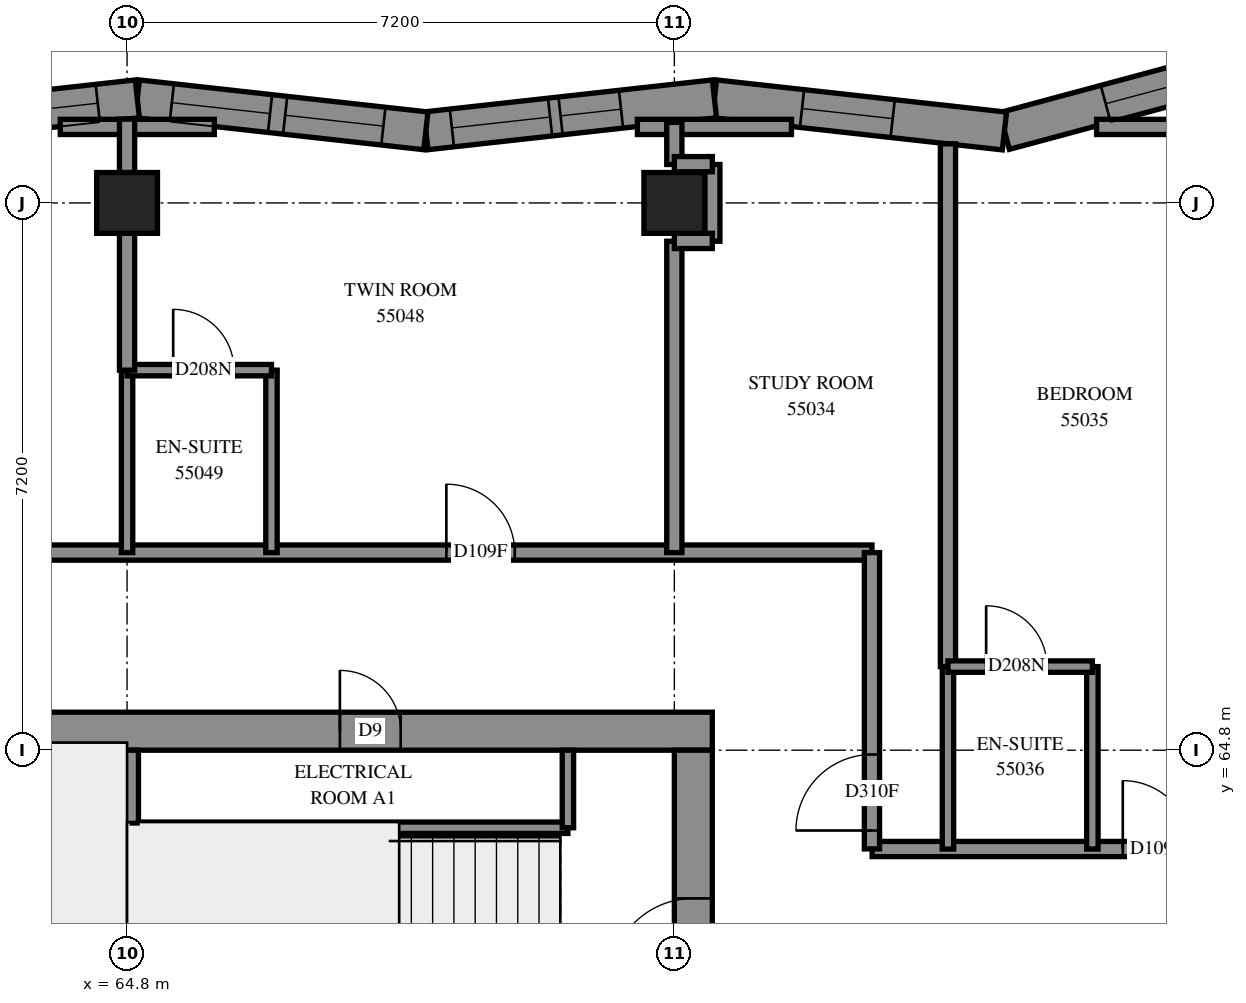
"""IFC4 building model, lengths in metres.
Left out: names, types, materials, properties, quantities, classifications, styles, units other than length and angle.
Written with IfcOpenShell. Run it as: python <this file> out.ifc"""

import sys

from ifc_helpers import new_model, si_unit, direction, frame, frame_2d, origin, origin_2d, place, context, subcontext, project, spatial, polyline, rectangle, outline, extrude, element, fill, save


model = new_model("IFC4")
c1 = context("Model", 3, precision=1e-05, world=origin(), true_north=direction((0.0, 1.0)))
c2 = subcontext(c1, "Body", "Model", "MODEL_VIEW")
j1 = project(units=[si_unit("LENGTHUNIT", "METRE"), si_unit("PLANEANGLEUNIT", "RADIAN")], contexts=[c1])
p1 = place(None, origin())
s1 = spatial("IfcSite", under=j1, at=p1, CompositionType="ELEMENT")
p2 = place(p1, origin())
s2 = spatial("IfcBuilding", under=s1, at=p2, CompositionType="ELEMENT")
p3 = place(p2, frame((0.0, 0.0, 203.2)))
s3 = spatial("IfcBuildingStorey", under=s2, at=p3, CompositionType="ELEMENT", Elevation=203.2)
for number, where, z_axis, x_axis in (
    (1, (64.8, 72.0, 0.0), (0.0, 0.0, 1.0), (1.0, 0.0, 0.0)),
    (2, (72.0, 72.0, 0.0), (0.0, 0.0, 1.0), (1.0, 0.0, 0.0)),
):
    element("IfcColumn", number, at=place(p3, frame(where, z_axis=z_axis, x_axis=x_axis)), inside=s3, PredefinedType="COLUMN", context=c2, shape_type="SweptSolid", body=[
        extrude(rectangle(XDim=0.8, YDim=0.8, at=origin_2d()), origin(), (0.0, 0.0, 1.0), 3.1),
    ])
p4 = place(p3, frame((57.1, 65.05, -0.3), z_axis=(0.0, 0.0, 1.0), x_axis=(1.0, 0.0, 0.0)))
e3 = element("IfcWall", 3, at=p4, inside=s3, PredefinedType="SHEAR", context=c2, shape_type="SweptSolid", body=[
    extrude(rectangle(XDim=15.4, YDim=0.5, at=frame_2d((7.7, 0.0))), origin(), (0.0, 0.0, 1.0), 2.7),
])
p5 = place(p4, frame((10.5, 0.0, 0.3)))
e4 = element("IfcOpeningElement", 4, at=p5, cuts=e3, PredefinedType="OPENING", context=c2, shape_type="SweptSolid", body=[
    extrude(rectangle(XDim=0.8, YDim=2.1, at=frame_2d((0.4, 1.05))), frame((0.0, 0.26, 0.0), z_axis=(0.0, -1.0, 0.0), x_axis=(1.0, 0.0, 0.0)), (0.0, 0.0, 1.0), 0.52),
])
p6 = place(p3, frame((72.25, 50.4, -0.3), z_axis=(0.0, 0.0, 1.0), x_axis=(0.0, 1.0, 0.0)))
e5 = element("IfcWall", 5, at=p6, inside=s3, PredefinedType="SHEAR", context=c2, shape_type="SweptSolid", body=[
    extrude(rectangle(XDim=14.4, YDim=0.5, at=frame_2d((7.2, 0.0))), origin(), (0.0, 0.0, 1.0), 2.7),
])
p7 = place(p6, frame((4.55, 0.0, 0.3)))
e6 = element("IfcOpeningElement", 6, at=p7, cuts=e5, PredefinedType="OPENING", context=c2, shape_type="SweptSolid", body=[
    extrude(rectangle(XDim=1.1, YDim=2.1, at=frame_2d((0.55, 1.05))), frame((0.0, 0.26, 0.0), z_axis=(0.0, -1.0, 0.0), x_axis=(1.0, 0.0, 0.0)), (0.0, 0.0, 1.0), 0.52),
])
p8 = place(p6, frame((11.35, 0.0, 0.3)))
e7 = element("IfcOpeningElement", 7, at=p8, cuts=e5, PredefinedType="OPENING", context=c2, shape_type="SweptSolid", body=[
    extrude(rectangle(XDim=1.1, YDim=2.1, at=frame_2d((0.55, 1.05))), frame((0.0, 0.26, 0.0), z_axis=(0.0, -1.0, 0.0), x_axis=(1.0, 0.0, 0.0)), (0.0, 0.0, 1.0), 0.52),
])
p9 = place(p3, frame((64.8, 60.6, 0.0), z_axis=(0.0, 0.0, 1.0), x_axis=(0.0, 1.0, 0.0)))
e8 = element("IfcWall", 8, at=p9, inside=s3, PredefinedType="SOLIDWALL", context=c2, shape_type="SweptSolid", body=[
    extrude(rectangle(XDim=4.2, YDim=0.3, at=frame_2d((2.1, 0.0))), origin(), (0.0, 0.0, 1.0), 3.1),
])
p10 = place(p3, frame((79.993, 73.928, 0.0), z_axis=(0.0, 0.0, 1.0), x_axis=(-0.9656859812, -0.259712506, 0.0)))
e9 = element("IfcWall", 9, at=p10, inside=s3, PredefinedType="SOLIDWALL", context=c2, shape_type="SweptSolid", body=[
    extrude(outline(polyline([(-0.199, -0.25), (3.732, -0.25), (3.826, 0.25), (0.199, 0.25), (-0.199, -0.25)])), origin(), (0.0, 0.0, 1.0), 3.1),
])
p11 = place(p10, frame((1.2, 0.0, 0.45)))
e10 = element("IfcOpeningElement", 10, at=p11, cuts=e9, PredefinedType="OPENING", context=c2, shape_type="SweptSolid", body=[
    extrude(rectangle(XDim=1.2, YDim=2.5, at=frame_2d((0.6, 1.25))), frame((0.0, 0.26, 0.0), z_axis=(0.0, -1.0, 0.0), x_axis=(1.0, 0.0, 0.0)), (0.0, 0.0, 1.0), 0.52),
])
p12 = place(p3, frame((76.343, 72.946, 0.0), z_axis=(0.0, 0.0, 1.0), x_axis=(-0.9939056334, 0.1102342595, 0.0)))
e11 = element("IfcWall", 11, at=p12, inside=s3, PredefinedType="SOLIDWALL", context=c2, shape_type="SweptSolid", body=[
    extrude(outline(polyline([(0.047, -0.25), (3.867, -0.25), (3.811, 0.25), (-0.047, 0.25), (0.047, -0.25)])), origin(), (0.0, 0.0, 1.0), 3.1),
])
p13 = place(p12, frame((1.48, 0.0, 0.45)))
e12 = element("IfcOpeningElement", 12, at=p13, cuts=e11, PredefinedType="OPENING", context=c2, shape_type="SweptSolid", body=[
    extrude(rectangle(XDim=1.2, YDim=2.5, at=frame_2d((0.6, 1.25))), frame((0.0, 0.26, 0.0), z_axis=(0.0, -1.0, 0.0), x_axis=(1.0, 0.0, 0.0)), (0.0, 0.0, 1.0), 0.52),
])
p14 = place(p3, frame((72.527, 73.37, 0.0), z_axis=(0.0, 0.0, 1.0), x_axis=(-0.99390702, -0.1102217568, 0.0)))
e13 = element("IfcWall", 13, at=p14, inside=s3, PredefinedType="SOLIDWALL", context=c2, shape_type="SweptSolid", body=[
    extrude(outline(polyline([(-0.028, -0.25), (3.792, -0.25), (3.847, 0.25), (0.028, 0.25), (-0.028, -0.25)])), origin(), (0.0, 0.0, 1.0), 3.1),
])
p15 = place(p14, frame((2.175, 0.0, 0.45)))
e14 = element("IfcOpeningElement", 14, at=p15, cuts=e13, PredefinedType="OPENING", context=c2, shape_type="SweptSolid", body=[
    extrude(rectangle(XDim=1.3, YDim=2.5, at=frame_2d((0.65, 1.25))), frame((0.0, 0.26, 0.0), z_axis=(0.0, -1.0, 0.0), x_axis=(1.0, 0.0, 0.0)), (0.0, 0.0, 1.0), 0.52),
])
p16 = place(p14, frame((1.236, 0.0, 0.45)))
e15 = element("IfcOpeningElement", 15, at=p16, cuts=e13, PredefinedType="OPENING", context=c2, shape_type="SweptSolid", body=[
    extrude(rectangle(XDim=0.8, YDim=2.5, at=frame_2d((0.4, 1.25))), frame((0.0, 0.26, 0.0), z_axis=(0.0, -1.0, 0.0), x_axis=(1.0, 0.0, 0.0)), (0.0, 0.0, 1.0), 0.52),
])
p17 = place(p3, frame((68.731, 72.948, 0.0), z_axis=(0.0, 0.0, 1.0), x_axis=(-0.99390702, 0.1102217568, 0.0)))
e16 = element("IfcWall", 16, at=p17, inside=s3, PredefinedType="SOLIDWALL", context=c2, shape_type="SweptSolid", body=[
    extrude(outline(polyline([(0.028, -0.25), (3.847, -0.25), (3.792, 0.25), (-0.028, 0.25), (0.028, -0.25)])), origin(), (0.0, 0.0, 1.0), 3.1),
])
p18 = place(p17, frame((0.562, 0.0, 0.45)))
e17 = element("IfcOpeningElement", 17, at=p18, cuts=e16, PredefinedType="OPENING", context=c2, shape_type="SweptSolid", body=[
    extrude(rectangle(XDim=1.3, YDim=2.5, at=frame_2d((0.65, 1.25))), frame((0.0, 0.26, 0.0), z_axis=(0.0, -1.0, 0.0), x_axis=(1.0, 0.0, 0.0)), (0.0, 0.0, 1.0), 0.52),
])
p19 = place(p17, frame((2.062, 0.0, 0.45)))
e18 = element("IfcOpeningElement", 18, at=p19, cuts=e16, PredefinedType="OPENING", context=c2, shape_type="SweptSolid", body=[
    extrude(rectangle(XDim=1.3, YDim=2.5, at=frame_2d((0.65, 1.25))), frame((0.0, 0.26, 0.0), z_axis=(0.0, -1.0, 0.0), x_axis=(1.0, 0.0, 0.0)), (0.0, 0.0, 1.0), 0.52),
])
p20 = place(p3, frame((64.935, 73.37, 0.0), z_axis=(0.0, 0.0, 1.0), x_axis=(-0.993907338, -0.1102188888, 0.0)))
e19 = element("IfcWall", 19, at=p20, inside=s3, PredefinedType="SOLIDWALL", context=c2, shape_type="SweptSolid", body=[
    extrude(outline(polyline([(-0.028, -0.25), (3.792, -0.25), (3.847, 0.25), (0.028, 0.25), (-0.028, -0.25)])), origin(), (0.0, 0.0, 1.0), 3.1),
])
p21 = place(p20, frame((0.524, 0.0, 0.45)))
e20 = element("IfcOpeningElement", 20, at=p21, cuts=e19, PredefinedType="OPENING", context=c2, shape_type="SweptSolid", body=[
    extrude(rectangle(XDim=1.3, YDim=2.5, at=frame_2d((0.65, 1.25))), frame((0.0, 0.26, 0.0), z_axis=(0.0, -1.0, 0.0), x_axis=(1.0, 0.0, 0.0)), (0.0, 0.0, 1.0), 0.52),
])
p22 = place(p20, frame((2.024, 0.0, 0.45)))
e21 = element("IfcOpeningElement", 21, at=p22, cuts=e19, PredefinedType="OPENING", context=c2, shape_type="SweptSolid", body=[
    extrude(rectangle(XDim=1.3, YDim=2.5, at=frame_2d((0.65, 1.25))), frame((0.0, 0.26, 0.0), z_axis=(0.0, -1.0, 0.0), x_axis=(1.0, 0.0, 0.0)), (0.0, 0.0, 1.0), 0.52),
])
p23 = place(p3, frame((64.95, 63.78, 0.0), z_axis=(0.0, 0.0, 1.0), x_axis=(1.0, 0.0, 0.0)))
e22 = element("IfcWall", 22, at=p23, inside=s3, PredefinedType="PARTITIONING", context=c2, shape_type="SweptSolid", body=[
    extrude(rectangle(XDim=5.65, YDim=0.15, at=frame_2d((2.825, 0.0))), origin(), (0.0, 0.0, 1.0), 3.1),
])
p24 = place(p3, frame((70.6, 63.78, 0.0), z_axis=(0.0, 0.0, 1.0), x_axis=(0.0, 1.0, 0.0)))
e23 = element("IfcWall", 23, at=p24, inside=s3, PredefinedType="PARTITIONING", context=c2, shape_type="SweptSolid", body=[
    extrude(rectangle(XDim=1.02, YDim=0.15, at=frame_2d((0.51, 0.0))), origin(), (0.0, 0.0, 1.0), 3.1),
])
p25 = place(p3, frame((55.0, 67.4, 0.0), z_axis=(0.0, 0.0, 1.0), x_axis=(1.0, 0.0, 0.0)))
e24 = element("IfcWall", 24, at=p25, inside=s3, PredefinedType="PARTITIONING", context=c2, shape_type="SweptSolid", body=[
    extrude(rectangle(XDim=19.6, YDim=0.2, at=frame_2d((9.8, 0.0))), origin(), (0.0, 0.0, 1.0), 3.1),
])
p26 = place(p25, frame((6.499, 0.0, 0.0)))
e25 = element("IfcOpeningElement", 25, at=p26, cuts=e24, PredefinedType="OPENING", context=c2, shape_type="SweptSolid", body=[
    extrude(rectangle(XDim=0.9, YDim=2.1, at=frame_2d((0.45, 1.05))), frame((0.0, 0.11, 0.0), z_axis=(0.0, -1.0, 0.0), x_axis=(1.0, 0.0, 0.0)), (0.0, 0.0, 1.0), 0.22),
])
p27 = place(p25, frame((14.001, 0.0, 0.0)))
e26 = element("IfcOpeningElement", 26, at=p27, cuts=e24, PredefinedType="OPENING", context=c2, shape_type="SweptSolid", body=[
    extrude(rectangle(XDim=0.9, YDim=2.1, at=frame_2d((0.45, 1.05))), frame((0.0, 0.11, 0.0), z_axis=(0.0, -1.0, 0.0), x_axis=(1.0, 0.0, 0.0)), (0.0, 0.0, 1.0), 0.22),
])
p28 = place(p3, frame((75.6, 65.9, 0.0), z_axis=(0.0, 0.0, 1.0), x_axis=(0.0, 1.0, 0.0)))
e27 = element("IfcWall", 27, at=p28, inside=s3, PredefinedType="PARTITIONING", context=c2, shape_type="SweptSolid", body=[
    extrude(rectangle(XDim=6.877, YDim=0.2, at=frame_2d((3.439, 0.0))), origin(), (0.0, 0.0, 1.0), 3.1),
])
p29 = place(p3, frame((74.602, 63.5, 0.0), z_axis=(0.0, 0.0, 1.0), x_axis=(1.0, 0.0, 0.0)))
e28 = element("IfcWall", 28, at=p29, inside=s3, PredefinedType="PARTITIONING", context=c2, shape_type="SweptSolid", body=[
    extrude(rectangle(XDim=4.598, YDim=0.2, at=frame_2d((2.299, 0.0))), origin(), (0.0, 0.0, 1.0), 3.1),
])
p30 = place(p29, frame((3.298, 0.0, 0.0)))
e29 = element("IfcOpeningElement", 29, at=p30, cuts=e28, PredefinedType="OPENING", context=c2, shape_type="SweptSolid", body=[
    extrude(rectangle(XDim=0.9, YDim=2.1, at=frame_2d((0.45, 1.05))), frame((0.0, 0.11, 0.0), z_axis=(0.0, -1.0, 0.0), x_axis=(1.0, 0.0, 0.0)), (0.0, 0.0, 1.0), 0.22),
])
p31 = place(p3, frame((72.0, 67.4, 0.0), z_axis=(0.0, 0.0, 1.0), x_axis=(0.0, 1.0, 0.0)))
e30 = element("IfcWall", 30, at=p31, inside=s3, PredefinedType="PARTITIONING", context=c2, shape_type="SweptSolid", body=[
    extrude(rectangle(XDim=4.096, YDim=0.2, at=frame_2d((2.048, 0.0))), origin(), (0.0, 0.0, 1.0), 3.1),
])
p32 = place(p3, frame((74.6, 63.502, 0.0), z_axis=(0.0, 0.0, 1.0), x_axis=(0.0, 1.0, 0.0)))
e31 = element("IfcWall", 31, at=p32, inside=s3, PredefinedType="PARTITIONING", context=c2, shape_type="SweptSolid", body=[
    extrude(rectangle(XDim=3.898, YDim=0.2, at=frame_2d((1.949, 0.0))), origin(), (0.0, 0.0, 1.0), 3.1),
])
p33 = place(p32, frame((0.242, 0.0, 0.0)))
e32 = element("IfcOpeningElement", 32, at=p33, cuts=e31, PredefinedType="OPENING", context=c2, shape_type="SweptSolid", body=[
    extrude(rectangle(XDim=1.0, YDim=2.1, at=frame_2d((0.5, 1.05))), frame((0.0, 0.11, 0.0), z_axis=(0.0, -1.0, 0.0), x_axis=(1.0, 0.0, 0.0)), (0.0, 0.0, 1.0), 0.22),
])
for number, where, z_axis, x_axis in (
    (33, (75.6, 63.5, 0.0), (0.0, 0.0, 1.0), (0.0, 1.0, 0.0)),
    (34, (77.5, 63.5, 0.0), (0.0, 0.0, 1.0), (0.0, 1.0, 0.0)),
    (35, (66.7, 67.4, 0.0), (0.0, 0.0, 1.0), (0.0, 1.0, 0.0)),
    (36, (64.8, 67.4, 0.0), (0.0, 0.0, 1.0), (0.0, 1.0, 0.0)),
):
    element("IfcWall", number, at=place(p3, frame(where, z_axis=z_axis, x_axis=x_axis)), inside=s3, PredefinedType="PARTITIONING", context=c2, shape_type="SweptSolid", body=[
        extrude(rectangle(XDim=2.4, YDim=0.15, at=frame_2d((1.2, 0.0))), origin(), (0.0, 0.0, 1.0), 3.1),
    ])
for number, where, z_axis, x_axis in (
    (37, (63.921, 73.0, 0.0), (0.0, 0.0, 1.0), (1.0, 0.0, 0.0)),
    (38, (71.514, 73.0, 0.0), (0.0, 0.0, 1.0), (1.0, 0.0, 0.0)),
):
    element("IfcWall", number, at=place(p3, frame(where, z_axis=z_axis, x_axis=x_axis)), inside=s3, PredefinedType="PARTITIONING", context=c2, shape_type="SweptSolid", body=[
        extrude(rectangle(XDim=2.027, YDim=0.2, at=frame_2d((1.013, 0.0))), origin(), (0.0, 0.0, 1.0), 3.1),
    ])
p34 = place(p3, frame((75.6, 65.9, 0.0), z_axis=(0.0, 0.0, 1.0), x_axis=(1.0, 0.0, 0.0)))
e39 = element("IfcWall", 39, at=p34, inside=s3, PredefinedType="PARTITIONING", context=c2, shape_type="SweptSolid", body=[
    extrude(rectangle(XDim=1.9, YDim=0.15, at=frame_2d((0.95, 0.0))), origin(), (0.0, 0.0, 1.0), 3.1),
])
p35 = place(p34, frame((0.502, 0.0, 0.0)))
e40 = element("IfcOpeningElement", 40, at=p35, cuts=e39, PredefinedType="OPENING", context=c2, shape_type="SweptSolid", body=[
    extrude(rectangle(XDim=0.8, YDim=2.1, at=frame_2d((0.4, 1.05))), frame((0.0, 0.085, 0.0), z_axis=(0.0, -1.0, 0.0), x_axis=(1.0, 0.0, 0.0)), (0.0, 0.0, 1.0), 0.17),
])
p36 = place(p3, frame((64.8, 69.8, 0.0), z_axis=(0.0, 0.0, 1.0), x_axis=(1.0, 0.0, 0.0)))
e41 = element("IfcWall", 41, at=p36, inside=s3, PredefinedType="PARTITIONING", context=c2, shape_type="SweptSolid", body=[
    extrude(rectangle(XDim=1.9, YDim=0.15, at=frame_2d((0.95, 0.0))), origin(), (0.0, 0.0, 1.0), 3.1),
])
p37 = place(p36, frame((0.607, 0.0, 0.0)))
e42 = element("IfcOpeningElement", 42, at=p37, cuts=e41, PredefinedType="OPENING", context=c2, shape_type="SweptSolid", body=[
    extrude(rectangle(XDim=0.8, YDim=2.1, at=frame_2d((0.4, 1.05))), frame((0.0, 0.085, 0.0), z_axis=(0.0, -1.0, 0.0), x_axis=(1.0, 0.0, 0.0)), (0.0, 0.0, 1.0), 0.17),
])
p38 = place(p3, frame((64.8, 69.8, 0.0), z_axis=(0.0, 0.0, 1.0), x_axis=(0.0, 1.0, 0.0)))
e43 = element("IfcWall", 43, at=p38, inside=s3, PredefinedType="PARTITIONING", context=c2, shape_type="SweptSolid", body=[
    extrude(rectangle(XDim=1.8, YDim=0.2, at=frame_2d((0.9, 0.0))), origin(), (0.0, 0.0, 1.0), 3.1),
])
p39 = place(p3, frame((77.555, 73.0, 0.0), z_axis=(0.0, 0.0, 1.0), x_axis=(1.0, 0.0, 0.0)))
e44 = element("IfcWall", 44, at=p39, inside=s3, PredefinedType="PARTITIONING", context=c2, shape_type="SweptSolid", body=[
    extrude(rectangle(XDim=1.645, YDim=0.2, at=frame_2d((0.822, 0.0))), origin(), (0.0, 0.0, 1.0), 3.1),
])
p40 = place(p3, frame((72.5, 71.496, 0.0), z_axis=(0.0, 0.0, 1.0), x_axis=(0.0, 1.0, 0.0)))
e45 = element("IfcWall", 45, at=p40, inside=s3, PredefinedType="PARTITIONING", context=c2, shape_type="SweptSolid", body=[
    extrude(rectangle(XDim=1.01, YDim=0.2, at=frame_2d((0.505, 0.0))), origin(), (0.0, 0.0, 1.0), 3.1),
])
p41 = place(p3, frame((64.8, 72.4, 0.0), z_axis=(0.0, 0.0, 1.0), x_axis=(0.0, 1.0, 0.0)))
e46 = element("IfcWall", 46, at=p41, inside=s3, PredefinedType="PARTITIONING", context=c2, shape_type="SweptSolid", body=[
    extrude(rectangle(XDim=0.703, YDim=0.2, at=frame_2d((0.351, 0.0))), origin(), (0.0, 0.0, 1.0), 3.1),
])
p42 = place(p3, frame((72.0, 72.506, 0.0), z_axis=(0.0, 0.0, 1.0), x_axis=(0.0, 1.0, 0.0)))
e47 = element("IfcWall", 47, at=p42, inside=s3, PredefinedType="PARTITIONING", context=c2, shape_type="SweptSolid", body=[
    extrude(rectangle(XDim=0.553, YDim=0.2, at=frame_2d((0.277, 0.0))), origin(), (0.0, 0.0, 1.0), 3.1),
])
for number, where, z_axis, x_axis in (
    (48, (72.0, 71.5, 0.0), (0.0, 0.0, 1.0), (1.0, 0.0, 0.0)),
    (49, (72.0, 72.51, 0.0), (0.0, 0.0, 1.0), (1.0, 0.0, 0.0)),
):
    element("IfcWall", number, at=place(p3, frame(where, z_axis=z_axis, x_axis=x_axis)), inside=s3, PredefinedType="PARTITIONING", context=c2, shape_type="SweptSolid", body=[
        extrude(rectangle(XDim=0.5, YDim=0.2, at=frame_2d((0.25, 0.0))), origin(), (0.0, 0.0, 1.0), 3.1),
    ])
p43 = place(p11, origin())
e50 = element("IfcWindow", 50, at=p43, inside=s3, PartitioningType="SINGLE_PANEL", PredefinedType="WINDOW", context=c2, shape_type="SweptSolid", body=[
    extrude(rectangle(XDim=1.2, YDim=2.5, at=frame_2d((0.6, 1.25))), frame((0.0, 0.18, 0.0), z_axis=(0.0, -1.0, 0.0), x_axis=(1.0, 0.0, 0.0)), (0.0, 0.0, 1.0), 0.06),
])
fill(e10, e50)
p44 = place(p13, origin())
e51 = element("IfcWindow", 51, at=p44, inside=s3, PartitioningType="SINGLE_PANEL", PredefinedType="WINDOW", context=c2, shape_type="SweptSolid", body=[
    extrude(rectangle(XDim=1.2, YDim=2.5, at=frame_2d((0.6, 1.25))), frame((0.0, 0.18, 0.0), z_axis=(0.0, -1.0, 0.0), x_axis=(1.0, 0.0, 0.0)), (0.0, 0.0, 1.0), 0.06),
])
fill(e12, e51)
p45 = place(p15, origin())
e52 = element("IfcWindow", 52, at=p45, inside=s3, PartitioningType="SINGLE_PANEL", PredefinedType="WINDOW", context=c2, shape_type="SweptSolid", body=[
    extrude(rectangle(XDim=1.3, YDim=2.5, at=frame_2d((0.65, 1.25))), frame((0.0, 0.18, 0.0), z_axis=(0.0, -1.0, 0.0), x_axis=(1.0, 0.0, 0.0)), (0.0, 0.0, 1.0), 0.06),
])
fill(e14, e52)
p46 = place(p18, origin())
e53 = element("IfcWindow", 53, at=p46, inside=s3, PartitioningType="SINGLE_PANEL", PredefinedType="WINDOW", context=c2, shape_type="SweptSolid", body=[
    extrude(rectangle(XDim=1.3, YDim=2.5, at=frame_2d((0.65, 1.25))), frame((0.0, 0.18, 0.0), z_axis=(0.0, -1.0, 0.0), x_axis=(1.0, 0.0, 0.0)), (0.0, 0.0, 1.0), 0.06),
])
fill(e17, e53)
p47 = place(p19, origin())
e54 = element("IfcWindow", 54, at=p47, inside=s3, PartitioningType="SINGLE_PANEL", PredefinedType="WINDOW", context=c2, shape_type="SweptSolid", body=[
    extrude(rectangle(XDim=1.3, YDim=2.5, at=frame_2d((0.65, 1.25))), frame((0.0, 0.12, 0.0), z_axis=(0.0, -1.0, 0.0), x_axis=(1.0, 0.0, 0.0)), (0.0, 0.0, 1.0), 0.06),
])
fill(e18, e54)
p48 = place(p21, origin())
e55 = element("IfcWindow", 55, at=p48, inside=s3, PartitioningType="SINGLE_PANEL", PredefinedType="WINDOW", context=c2, shape_type="SweptSolid", body=[
    extrude(rectangle(XDim=1.3, YDim=2.5, at=frame_2d((0.65, 1.25))), frame((0.0, 0.12, 0.0), z_axis=(0.0, -1.0, 0.0), x_axis=(1.0, 0.0, 0.0)), (0.0, 0.0, 1.0), 0.06),
])
fill(e20, e55)
p49 = place(p5, origin())
e56 = element("IfcDoor", 56, at=p49, inside=s3, OperationType="SINGLE_SWING_RIGHT", PredefinedType="DOOR", context=c2, shape_type="SweptSolid", body=[
    extrude(rectangle(XDim=0.8, YDim=2.1, at=frame_2d((0.4, 1.05))), frame((0.0, 0.025, 0.0), z_axis=(0.0, -1.0, 0.0), x_axis=(1.0, 0.0, 0.0)), (0.0, 0.0, 1.0), 0.05),
])
fill(e4, e56)
p50 = place(p8, origin())
e57 = element("IfcDoor", 57, at=p50, inside=s3, OperationType="SINGLE_SWING_RIGHT", PredefinedType="DOOR", context=c2, shape_type="SweptSolid", body=[
    extrude(rectangle(XDim=1.1, YDim=2.1, at=frame_2d((0.55, 1.05))), frame((0.0, 0.025, 0.0), z_axis=(0.0, -1.0, 0.0), x_axis=(1.0, 0.0, 0.0)), (0.0, 0.0, 1.0), 0.05),
])
fill(e7, e57)
p51 = place(p33, origin())
e58 = element("IfcDoor", 58, at=p51, inside=s3, OperationType="SINGLE_SWING_RIGHT", PredefinedType="DOOR", context=c2, shape_type="SweptSolid", body=[
    extrude(rectangle(XDim=1.0, YDim=2.1, at=frame_2d((0.5, 1.05))), frame((0.0, 0.025, 0.0), z_axis=(0.0, -1.0, 0.0), x_axis=(1.0, 0.0, 0.0)), (0.0, 0.0, 1.0), 0.05),
])
fill(e32, e58)
p52 = place(p30, origin())
e59 = element("IfcDoor", 59, at=p52, inside=s3, OperationType="SINGLE_SWING_LEFT", PredefinedType="DOOR", context=c2, shape_type="SweptSolid", body=[
    extrude(rectangle(XDim=0.9, YDim=2.1, at=frame_2d((0.45, 1.05))), frame((0.0, 0.025, 0.0), z_axis=(0.0, -1.0, 0.0), x_axis=(1.0, 0.0, 0.0)), (0.0, 0.0, 1.0), 0.05),
])
fill(e29, e59)
p53 = place(p35, origin())
e60 = element("IfcDoor", 60, at=p53, inside=s3, OperationType="SINGLE_SWING_RIGHT", PredefinedType="DOOR", context=c2, shape_type="SweptSolid", body=[
    extrude(rectangle(XDim=0.8, YDim=2.1, at=frame_2d((0.4, 1.05))), frame((0.0, 0.025, 0.0), z_axis=(0.0, -1.0, 0.0), x_axis=(1.0, 0.0, 0.0)), (0.0, 0.0, 1.0), 0.05),
])
fill(e40, e60)
p54 = place(p27, origin())
e61 = element("IfcDoor", 61, at=p54, inside=s3, OperationType="SINGLE_SWING_RIGHT", PredefinedType="DOOR", context=c2, shape_type="SweptSolid", body=[
    extrude(rectangle(XDim=0.9, YDim=2.1, at=frame_2d((0.45, 1.05))), frame((0.0, 0.025, 0.0), z_axis=(0.0, -1.0, 0.0), x_axis=(1.0, 0.0, 0.0)), (0.0, 0.0, 1.0), 0.05),
])
fill(e26, e61)
p55 = place(p37, origin())
e62 = element("IfcDoor", 62, at=p55, inside=s3, OperationType="SINGLE_SWING_RIGHT", PredefinedType="DOOR", context=c2, shape_type="SweptSolid", body=[
    extrude(rectangle(XDim=0.8, YDim=2.1, at=frame_2d((0.4, 1.05))), frame((0.0, 0.025, 0.0), z_axis=(0.0, -1.0, 0.0), x_axis=(1.0, 0.0, 0.0)), (0.0, 0.0, 1.0), 0.05),
])
fill(e42, e62)
p56 = place(p16, origin())
e63 = element("IfcWindow", 63, at=p56, inside=s3, PartitioningType="SINGLE_PANEL", PredefinedType="WINDOW", context=c2, shape_type="SweptSolid", body=[
    extrude(rectangle(XDim=0.8, YDim=2.5, at=frame_2d((0.4, 1.25))), frame((0.0, 0.18, 0.0), z_axis=(0.0, -1.0, 0.0), x_axis=(1.0, 0.0, 0.0)), (0.0, 0.0, 1.0), 0.06),
])
fill(e15, e63)
save(model, sys.argv[1])
